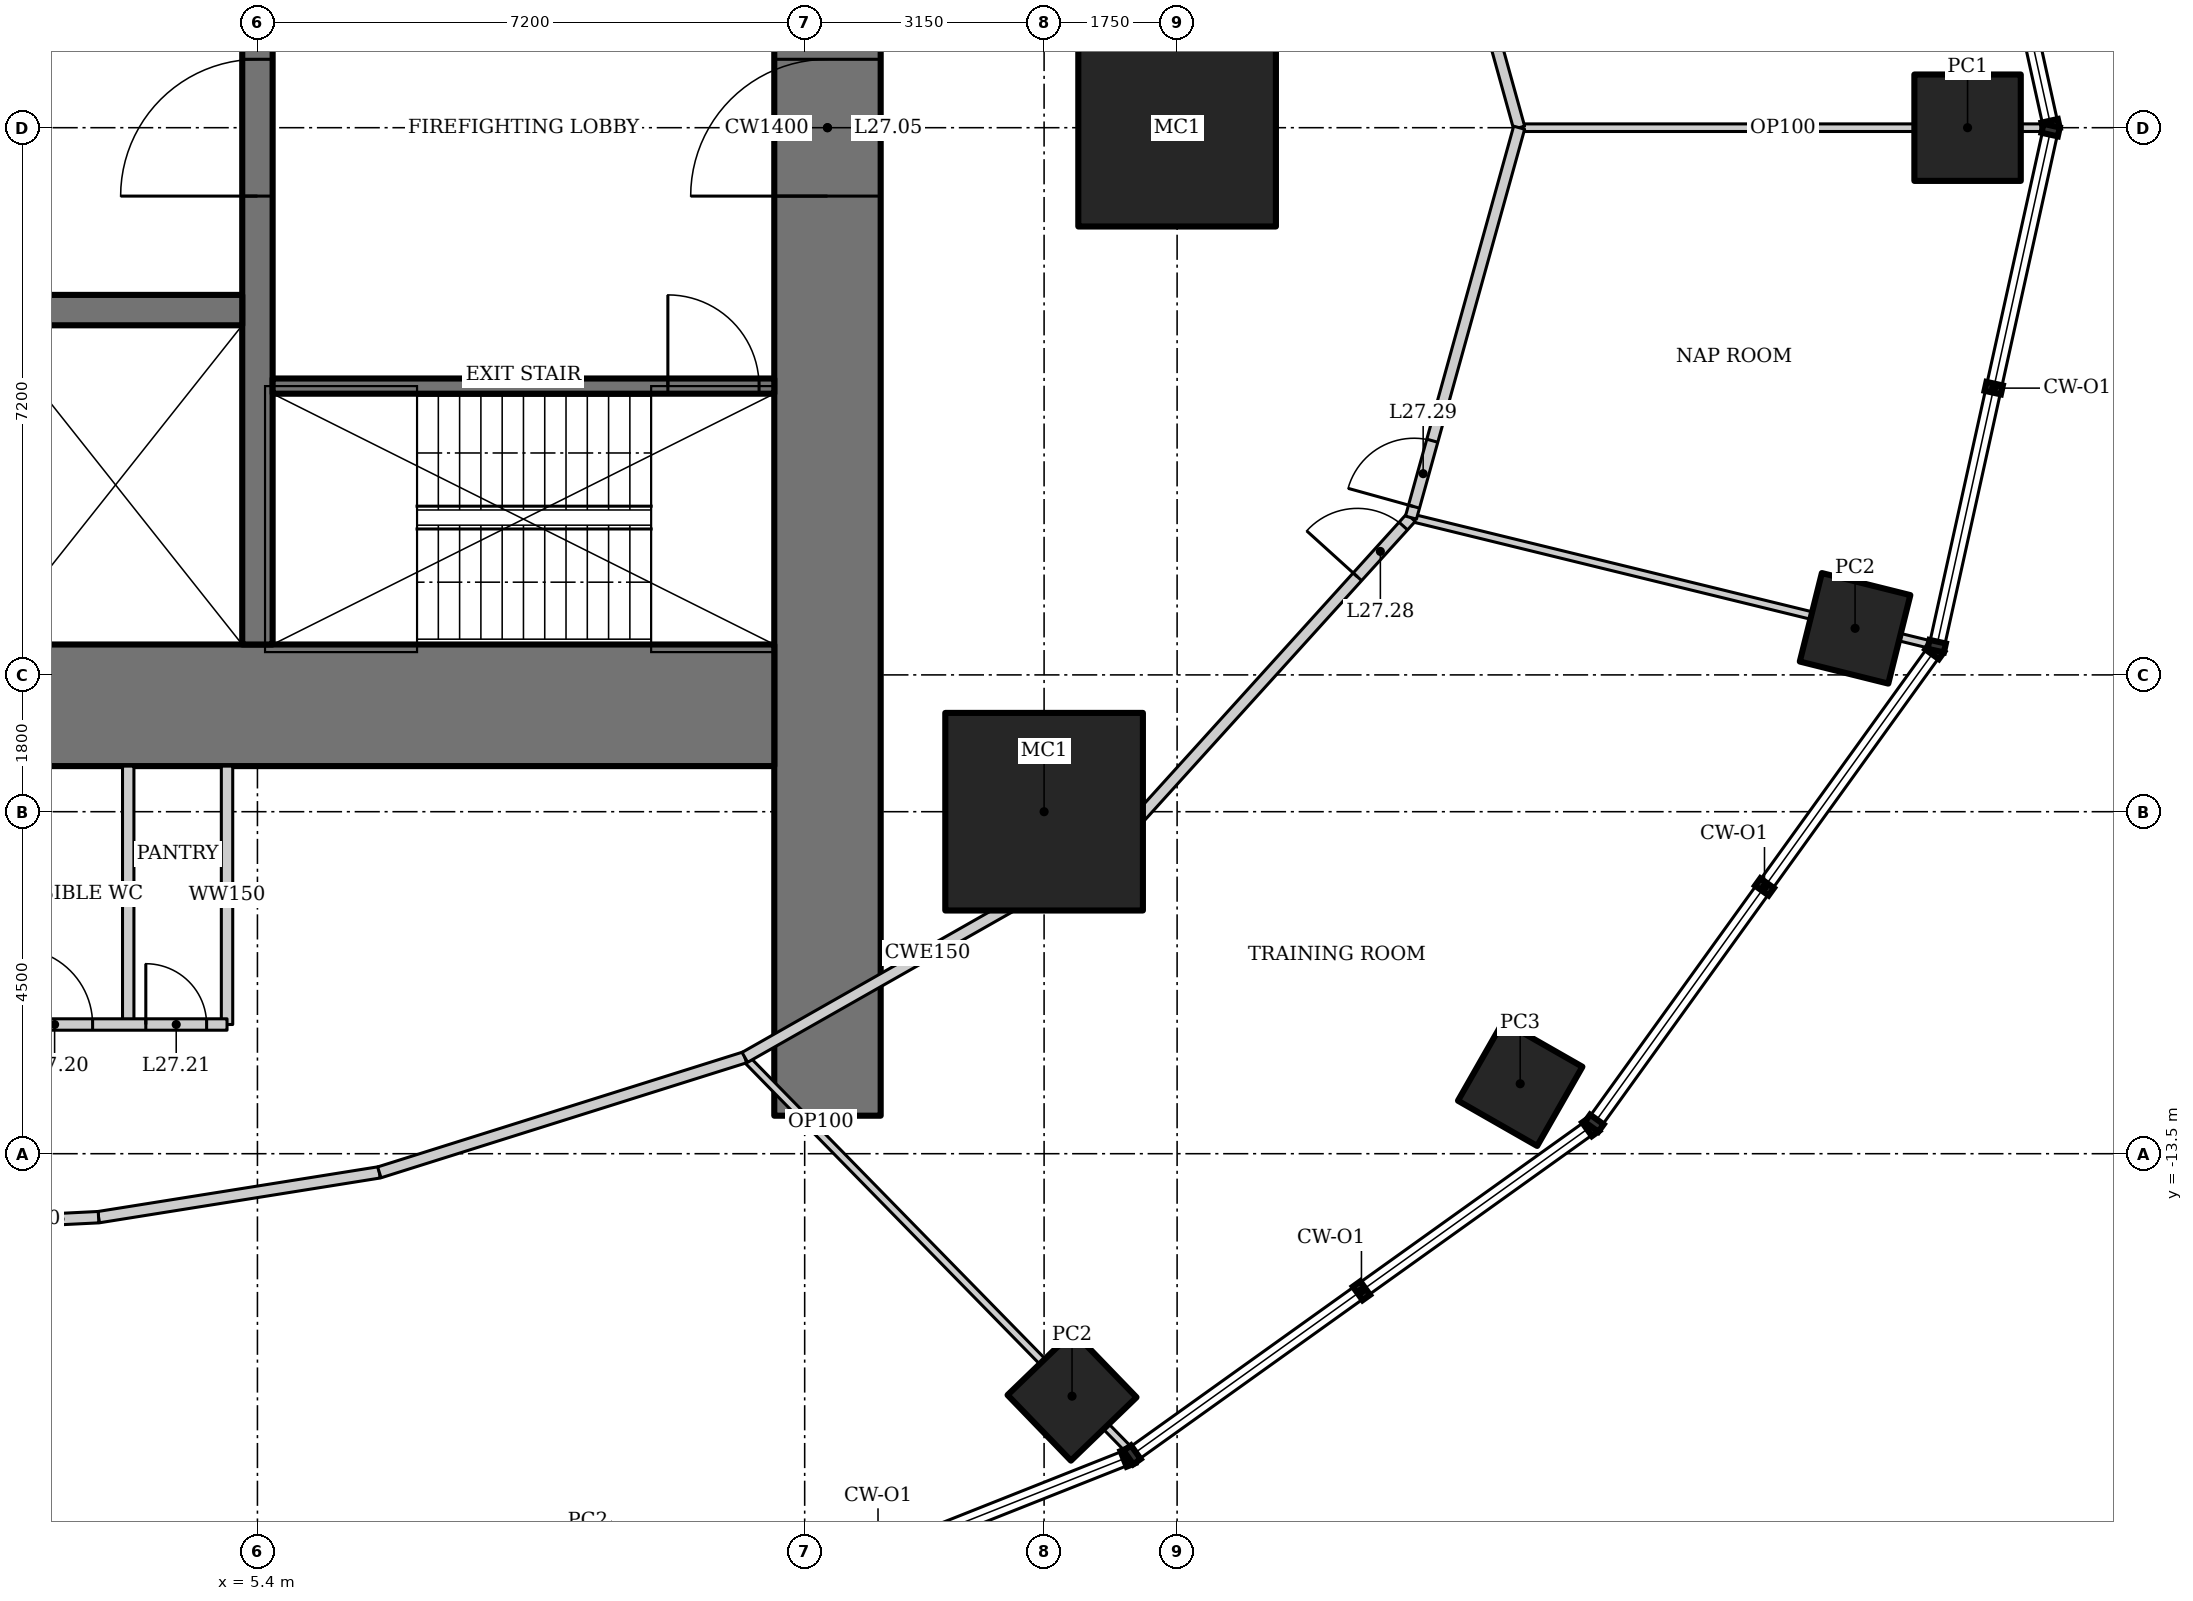
"""IFC4 building model, lengths in metres.
Left out: names, types, materials, properties, quantities, classifications, styles, units other than length and angle.
Written with IfcOpenShell. Run it as: python <this file> out.ifc"""

import sys

from ifc_helpers import new_model, si_unit, direction, frame, frame_2d, origin, origin_2d, place, context, subcontext, project, spatial, rectangle, hollow_rectangle, extrude, element, fill, save


model = new_model("IFC4")
c1 = context("Model", 3, precision=1e-05, world=origin(), true_north=direction((0.0, 1.0)))
c2 = subcontext(c1, "Body", "Model", "MODEL_VIEW")
j1 = project(units=[si_unit("LENGTHUNIT", "METRE"), si_unit("PLANEANGLEUNIT", "RADIAN")], contexts=[c1])
p1 = place(None, origin())
s1 = spatial("IfcSite", under=j1, at=p1, CompositionType="ELEMENT")
p2 = place(p1, origin())
s2 = spatial("IfcBuilding", under=s1, at=p2, CompositionType="ELEMENT")
p3 = place(p2, frame((0.0, 0.0, 117.4)))
s3 = spatial("IfcBuildingStorey", under=s2, at=p3, CompositionType="ELEMENT", Elevation=117.4)
for number, where, z_axis, x_axis in (
    (1, (17.5, 0.0, 0.0), (0.0, 0.0, 1.0), (1.0, 0.0, 0.0)),
    (2, (15.75, -9.0, 0.0), (0.0, 0.0, 1.0), (1.0, 0.0, 0.0)),
):
    element("IfcColumn", number, at=place(p3, frame(where, z_axis=z_axis, x_axis=x_axis)), inside=s3, PredefinedType="COLUMN", context=c2, shape_type="SweptSolid", body=[
        extrude(hollow_rectangle(XDim=2.6, YDim=2.6, WallThickness=0.13, at=origin_2d()), origin(), (0.0, 0.0, 1.0), 4.2),
    ])
p4 = place(p3, frame((27.9, 0.0, 0.0), z_axis=(0.0, 0.0, 1.0), x_axis=(1.0, 0.0, 0.0)))
e3 = element("IfcColumn", 3, at=p4, inside=s3, PredefinedType="COLUMN", context=c2, shape_type="SweptSolid", body=[
    extrude(hollow_rectangle(XDim=1.4, YDim=1.4, WallThickness=0.1, at=origin_2d()), origin(), (0.0, 0.0, 1.0), 4.2),
])
for number, where, z_axis, x_axis in (
    (4, (9.749, -19.133, 0.0), (0.0, 0.0, 1.0), (0.891, 0.454, 0.0)),
    (5, (16.118, -16.69, 0.0), (0.0, 0.0, 1.0), (0.719, 0.695, 0.0)),
):
    element("IfcColumn", number, at=place(p3, frame(where, z_axis=z_axis, x_axis=x_axis)), inside=s3, PredefinedType="COLUMN", context=c2, shape_type="SweptSolid", body=[
        extrude(hollow_rectangle(XDim=1.2, YDim=1.2, WallThickness=0.1, at=origin_2d()), origin(), (0.0, 0.0, 1.0), 4.2),
    ])
p5 = place(p3, frame((22.014, -12.579, 0.0), z_axis=(0.0, 0.0, 1.0), x_axis=(0.496139221777, 0.86824298017, 0.0)))
e6 = element("IfcColumn", 6, at=p5, inside=s3, PredefinedType="COLUMN", context=c2, shape_type="SweptSolid", body=[
    extrude(hollow_rectangle(XDim=1.2, YDim=1.2, WallThickness=0.12, at=origin_2d()), origin(), (0.0, 0.0, 1.0), 4.2),
])
p6 = place(p3, frame((26.42, -6.587, 0.0), z_axis=(0.0, 0.0, 1.0), x_axis=(0.2419218956, 0.970295726276, 0.0)))
e7 = element("IfcColumn", 7, at=p6, inside=s3, PredefinedType="COLUMN", context=c2, shape_type="SweptSolid", body=[
    extrude(hollow_rectangle(XDim=1.2, YDim=1.2, WallThickness=0.1, at=origin_2d()), origin(), (0.0, 0.0, 1.0), 4.2),
])
p7 = place(p3, frame((12.9, -13.0, 0.0), z_axis=(0.0, 0.0, 1.0), x_axis=(0.0, 1.0, 0.0)))
e8 = element("IfcWall", 8, at=p7, inside=s3, PredefinedType="SHEAR", context=c2, shape_type="SweptSolid", body=[
    extrude(rectangle(XDim=26.0, YDim=1.4, at=frame_2d((13.0, 0.0))), origin(), (0.0, 0.0, 1.0), 4.2),
])
p8 = place(p7, frame((12.1, 0.0, 0.0)))
e9 = element("IfcOpeningElement", 9, at=p8, cuts=e8, PredefinedType="OPENING", context=c2, shape_type="SweptSolid", body=[
    extrude(rectangle(XDim=1.8, YDim=2.1, at=frame_2d((0.9, 1.05))), frame((0.0, 0.71, 0.0), z_axis=(0.0, -1.0, 0.0), x_axis=(1.0, 0.0, 0.0)), (0.0, 0.0, 1.0), 1.42),
])
p9 = place(p3, frame((-12.2, -7.6, 0.0), z_axis=(0.0, 0.0, 1.0), x_axis=(1.0, 0.0, 0.0)))
e10 = element("IfcWall", 10, at=p9, inside=s3, PredefinedType="SHEAR", context=c2, shape_type="SweptSolid", body=[
    extrude(rectangle(XDim=24.4, YDim=1.6, at=frame_2d((12.2, 0.0))), origin(), (0.0, 0.0, 1.0), 4.2),
])
p10 = place(p3, frame((5.4, -6.8, 0.0), z_axis=(0.0, 0.0, 1.0), x_axis=(0.0, 1.0, 0.0)))
e11 = element("IfcWall", 11, at=p10, inside=s3, PredefinedType="SHEAR", context=c2, shape_type="SweptSolid", body=[
    extrude(rectangle(XDim=13.6, YDim=0.4, at=frame_2d((6.8, 0.0))), origin(), (0.0, 0.0, 1.0), 4.2),
])
p11 = place(p10, frame((5.9, 0.0, 0.0)))
e12 = element("IfcOpeningElement", 12, at=p11, cuts=e11, PredefinedType="OPENING", context=c2, shape_type="SweptSolid", body=[
    extrude(rectangle(XDim=1.8, YDim=2.1, at=frame_2d((0.9, 1.05))), frame((0.0, 0.21, 0.0), z_axis=(0.0, -1.0, 0.0), x_axis=(1.0, 0.0, 0.0)), (0.0, 0.0, 1.0), 0.42),
])
p12 = place(p3, frame((-5.2, -2.4, 0.0), z_axis=(0.0, 0.0, 1.0), x_axis=(1.0, 0.0, 0.0)))
e13 = element("IfcWall", 13, at=p12, inside=s3, PredefinedType="SHEAR", context=c2, shape_type="SweptSolid", body=[
    extrude(rectangle(XDim=10.4, YDim=0.4, at=frame_2d((5.2, 0.0))), origin(), (0.0, 0.0, 1.0), 4.2),
])
p13 = place(p3, frame((5.6, -3.4, 0.0), z_axis=(0.0, 0.0, 1.0), x_axis=(1.0, 0.0, 0.0)))
e14 = element("IfcWall", 14, at=p13, inside=s3, PredefinedType="SHEAR", context=c2, shape_type="SweptSolid", body=[
    extrude(rectangle(XDim=6.6, YDim=0.2, at=frame_2d((3.3, 0.0))), origin(), (0.0, 0.0, 1.0), 4.2),
])
p14 = place(p13, frame((5.2, 0.0, 0.0)))
e15 = element("IfcOpeningElement", 15, at=p14, cuts=e14, PredefinedType="OPENING", context=c2, shape_type="SweptSolid", body=[
    extrude(rectangle(XDim=1.2, YDim=2.1, at=frame_2d((0.6, 1.05))), frame((0.0, 0.11, 0.0), z_axis=(0.0, -1.0, 0.0), x_axis=(1.0, 0.0, 0.0)), (0.0, 0.0, 1.0), 0.22),
])
p15 = place(p3, frame((28.944, 0.0, 0.0), z_axis=(0.0, 0.0, 1.0), x_axis=(-1.0, 0.0, 0.0)))
e16 = element("IfcWall", 16, at=p15, inside=s3, PredefinedType="PARTITIONING", context=c2, shape_type="SweptSolid", body=[
    extrude(rectangle(XDim=6.944, YDim=0.1, at=frame_2d((3.472, 0.0))), origin(), (0.0, 0.0, 1.0), 3.204),
])
p16 = place(p3, frame((16.882, -17.414, 0.0), z_axis=(0.0, 0.0, 1.0), x_axis=(-0.699352142517, 0.714777294517, 0.0)))
e17 = element("IfcWall", 17, at=p16, inside=s3, PredefinedType="PARTITIONING", context=c2, shape_type="SweptSolid", body=[
    extrude(rectangle(XDim=7.249, YDim=0.1, at=frame_2d((3.625, 0.0))), origin(), (0.0, 0.0, 1.0), 3.321),
])
p17 = place(p3, frame((27.441, -6.809, 0.0), z_axis=(0.0, 0.0, 1.0), x_axis=(-0.971377572955, 0.237540755996, 0.0)))
e18 = element("IfcWall", 18, at=p17, inside=s3, PredefinedType="PARTITIONING", context=c2, shape_type="SweptSolid", body=[
    extrude(rectangle(XDim=7.066, YDim=0.1, at=frame_2d((3.533, 0.0))), origin(), (0.0, 0.0, 1.0), 3.113),
])
p18 = place(p3, frame((22.0, 0.0, 0.0), z_axis=(0.0, 0.0, 1.0), x_axis=(-0.267293817428, 0.963615076244, 0.0)))
e19 = element("IfcWall", 19, at=p18, inside=s3, PredefinedType="PARTITIONING", context=c2, shape_type="SweptSolid", body=[
    extrude(rectangle(XDim=5.324, YDim=0.15, at=frame_2d((2.662, 0.0))), origin(), (0.0, 0.0, 1.0), 4.05),
])
p19 = place(p3, frame((3.31, -14.335, 0.0), z_axis=(0.0, 0.0, 1.0), x_axis=(0.987511396594, 0.157547585181, 0.0)))
e20 = element("IfcWall", 20, at=p19, inside=s3, PredefinedType="PARTITIONING", context=c2, shape_type="SweptSolid", body=[
    extrude(rectangle(XDim=3.741, YDim=0.15, at=frame_2d((1.87, 0.0))), origin(), (0.0, 0.0, 1.0), 4.05),
])
p20 = place(p3, frame((7.004, -13.746, 0.0), z_axis=(0.0, 0.0, 1.0), x_axis=(0.953893934057, 0.300143903101, 0.0)))
e21 = element("IfcWall", 21, at=p20, inside=s3, PredefinedType="PARTITIONING", context=c2, shape_type="SweptSolid", body=[
    extrude(rectangle(XDim=5.042, YDim=0.15, at=frame_2d((2.521, 0.0))), origin(), (0.0, 0.0, 1.0), 4.05),
])
p21 = place(p3, frame((11.813, -12.232, 0.0), z_axis=(0.0, 0.0, 1.0), x_axis=(0.869375991036, 0.494151177485, 0.0)))
e22 = element("IfcWall", 22, at=p21, inside=s3, PredefinedType="PARTITIONING", context=c2, shape_type="SweptSolid", body=[
    extrude(rectangle(XDim=5.532, YDim=0.15, at=frame_2d((2.766, 0.0))), origin(), (0.0, 0.0, 1.0), 4.05),
])
p22 = place(p3, frame((16.623, -9.499, 0.0), z_axis=(0.0, 0.0, 1.0), x_axis=(0.671118353743, 0.741350224435, 0.0)))
e23 = element("IfcWall", 23, at=p22, inside=s3, PredefinedType="PARTITIONING", context=c2, shape_type="SweptSolid", body=[
    extrude(rectangle(XDim=5.892, YDim=0.15, at=frame_2d((2.946, 0.0))), origin(), (0.0, 0.0, 1.0), 4.05),
])
p23 = place(p22, frame((4.842, 0.0, 0.0)))
e24 = element("IfcOpeningElement", 24, at=p23, cuts=e23, PredefinedType="OPENING", context=c2, shape_type="SweptSolid", body=[
    extrude(rectangle(XDim=0.9, YDim=2.1, at=frame_2d((0.45, 1.05))), frame((0.0, 0.085, 0.0), z_axis=(0.0, -1.0, 0.0), x_axis=(1.0, 0.0, 0.0)), (0.0, 0.0, 1.0), 0.17),
])
p24 = place(p3, frame((20.577, -5.13, 0.0), z_axis=(0.0, 0.0, 1.0), x_axis=(0.267293817428, 0.963615076244, 0.0)))
e25 = element("IfcWall", 25, at=p24, inside=s3, PredefinedType="PARTITIONING", context=c2, shape_type="SweptSolid", body=[
    extrude(rectangle(XDim=5.324, YDim=0.15, at=frame_2d((2.662, 0.0))), origin(), (0.0, 0.0, 1.0), 4.05),
])
p25 = place(p24, frame((0.15, 0.0, 0.0)))
e26 = element("IfcOpeningElement", 26, at=p25, cuts=e25, PredefinedType="OPENING", context=c2, shape_type="SweptSolid", body=[
    extrude(rectangle(XDim=0.9, YDim=2.1, at=frame_2d((0.45, 1.05))), frame((0.0, 0.085, 0.0), z_axis=(0.0, -1.0, 0.0), x_axis=(1.0, 0.0, 0.0)), (0.0, 0.0, 1.0), 0.17),
])
for number, where, z_axis, x_axis in (
    (27, (5.0, -8.4, 0.0), (0.0, 0.0, 1.0), (0.0, -1.0, 0.0)),
    (28, (3.7, -8.4, 0.0), (0.0, 0.0, 1.0), (0.0, -1.0, 0.0)),
):
    element("IfcWall", number, at=place(p3, frame(where, z_axis=z_axis, x_axis=x_axis)), inside=s3, PredefinedType="SOLIDWALL", context=c2, shape_type="SweptSolid", body=[
        extrude(rectangle(XDim=3.4, YDim=0.15, at=frame_2d((1.7, 0.0))), origin(), (0.0, 0.0, 1.0), 4.05),
    ])
p26 = place(p3, frame((12.9, -13.0, 0.0), z_axis=(0.0, 0.0, 1.0), x_axis=(-0.714690391061, -0.699440951707, 0.0)))
e29 = element("IfcWall", 29, at=p26, inside=s3, PredefinedType="PARTITIONING", context=c2, shape_type="SweptSolid", body=[
    extrude(rectangle(XDim=0.24, YDim=0.1, at=frame_2d((0.12, 0.0))), origin(), (0.0, 0.0, 1.0), 4.05),
])
p27 = place(p3, frame((2.295, -14.385, 0.0), z_axis=(0.0, 0.0, 1.0), x_axis=(0.998761909217, 0.049745841003, 0.0)))
e30 = element("IfcWall", 30, at=p27, inside=s3, PredefinedType="PARTITIONING", context=c2, shape_type="SweptSolid", body=[
    extrude(rectangle(XDim=1.016, YDim=0.15, at=frame_2d((0.508, 0.0))), origin(), (0.0, 0.0, 1.0), 4.05),
])
p28 = place(p3, frame((2.131, -11.8, 0.0), z_axis=(0.0, 0.0, 1.0), x_axis=(1.0, 0.0, 0.0)))
e31 = element("IfcWall", 31, at=p28, inside=s3, PredefinedType="SOLIDWALL", context=c2, shape_type="SweptSolid", body=[
    extrude(rectangle(XDim=2.869, YDim=0.15, at=frame_2d((1.434, 0.0))), origin(), (0.0, 0.0, 1.0), 4.05),
])
p29 = place(p28, frame((0.1, 0.0, 0.0)))
e32 = element("IfcOpeningElement", 32, at=p29, cuts=e31, PredefinedType="OPENING", context=c2, shape_type="SweptSolid", body=[
    extrude(rectangle(XDim=1.0, YDim=2.1, at=frame_2d((0.5, 1.05))), frame((0.0, 0.085, 0.0), z_axis=(0.0, -1.0, 0.0), x_axis=(1.0, 0.0, 0.0)), (0.0, 0.0, 1.0), 0.17),
])
p30 = place(p28, frame((1.8, 0.0, 0.0)))
e33 = element("IfcOpeningElement", 33, at=p30, cuts=e31, PredefinedType="OPENING", context=c2, shape_type="SweptSolid", body=[
    extrude(rectangle(XDim=0.8, YDim=2.1, at=frame_2d((0.4, 1.05))), frame((0.0, 0.085, 0.0), z_axis=(0.0, -1.0, 0.0), x_axis=(1.0, 0.0, 0.0)), (0.0, 0.0, 1.0), 0.17),
])
p31 = place(p11, origin())
e34 = element("IfcDoor", 34, at=p31, inside=s3, OperationType="DOUBLE_DOOR_DOUBLE_SWING", PredefinedType="DOOR", context=c2, shape_type="SweptSolid", body=[
    extrude(rectangle(XDim=1.8, YDim=2.1, at=frame_2d((0.9, 1.05))), frame((0.0, 0.025, 0.0), z_axis=(0.0, -1.0, 0.0), x_axis=(1.0, 0.0, 0.0)), (0.0, 0.0, 1.0), 0.05),
])
fill(e12, e34)
p32 = place(p14, origin())
e35 = element("IfcDoor", 35, at=p32, inside=s3, OperationType="SINGLE_SWING_RIGHT", PredefinedType="DOOR", context=c2, shape_type="SweptSolid", body=[
    extrude(rectangle(XDim=1.2, YDim=2.1, at=frame_2d((0.6, 1.05))), frame((0.0, 0.025, 0.0), z_axis=(0.0, -1.0, 0.0), x_axis=(1.0, 0.0, 0.0)), (0.0, 0.0, 1.0), 0.05),
])
fill(e15, e35)
p33 = place(p8, origin())
e36 = element("IfcDoor", 36, at=p33, inside=s3, OperationType="DOUBLE_DOOR_DOUBLE_SWING", PredefinedType="DOOR", context=c2, shape_type="SweptSolid", body=[
    extrude(rectangle(XDim=1.8, YDim=2.1, at=frame_2d((0.9, 1.05))), frame((0.0, 0.025, 0.0), z_axis=(0.0, -1.0, 0.0), x_axis=(1.0, 0.0, 0.0)), (0.0, 0.0, 1.0), 0.05),
])
fill(e9, e36)
p34 = place(p29, origin())
e37 = element("IfcDoor", 37, at=p34, inside=s3, OperationType="SINGLE_SWING_LEFT", PredefinedType="DOOR", context=c2, shape_type="SweptSolid", body=[
    extrude(rectangle(XDim=1.0, YDim=2.1, at=frame_2d((0.5, 1.05))), frame((0.0, 0.025, 0.0), z_axis=(0.0, -1.0, 0.0), x_axis=(1.0, 0.0, 0.0)), (0.0, 0.0, 1.0), 0.05),
])
fill(e32, e37)
p35 = place(p30, origin())
e38 = element("IfcDoor", 38, at=p35, inside=s3, OperationType="SINGLE_SWING_LEFT", PredefinedType="DOOR", context=c2, shape_type="SweptSolid", body=[
    extrude(rectangle(XDim=0.8, YDim=2.1, at=frame_2d((0.4, 1.05))), frame((0.0, 0.025, 0.0), z_axis=(0.0, -1.0, 0.0), x_axis=(1.0, 0.0, 0.0)), (0.0, 0.0, 1.0), 0.05),
])
fill(e33, e38)
p36 = place(p23, origin())
e39 = element("IfcDoor", 39, at=p36, inside=s3, OperationType="SINGLE_SWING_LEFT", PredefinedType="DOOR", context=c2, shape_type="SweptSolid", body=[
    extrude(rectangle(XDim=0.9, YDim=2.1, at=frame_2d((0.45, 1.05))), frame((0.0, 0.025, 0.0), z_axis=(0.0, -1.0, 0.0), x_axis=(1.0, 0.0, 0.0)), (0.0, 0.0, 1.0), 0.05),
])
fill(e24, e39)
p37 = place(p25, origin())
e40 = element("IfcDoor", 40, at=p37, inside=s3, OperationType="SINGLE_SWING_LEFT", PredefinedType="DOOR", context=c2, shape_type="SweptSolid", body=[
    extrude(rectangle(XDim=0.9, YDim=2.1, at=frame_2d((0.45, 1.05))), frame((0.0, 0.025, 0.0), z_axis=(0.0, -1.0, 0.0), x_axis=(1.0, 0.0, 0.0)), (0.0, 0.0, 1.0), 0.05),
])
fill(e26, e40)
save(model, sys.argv[1])
